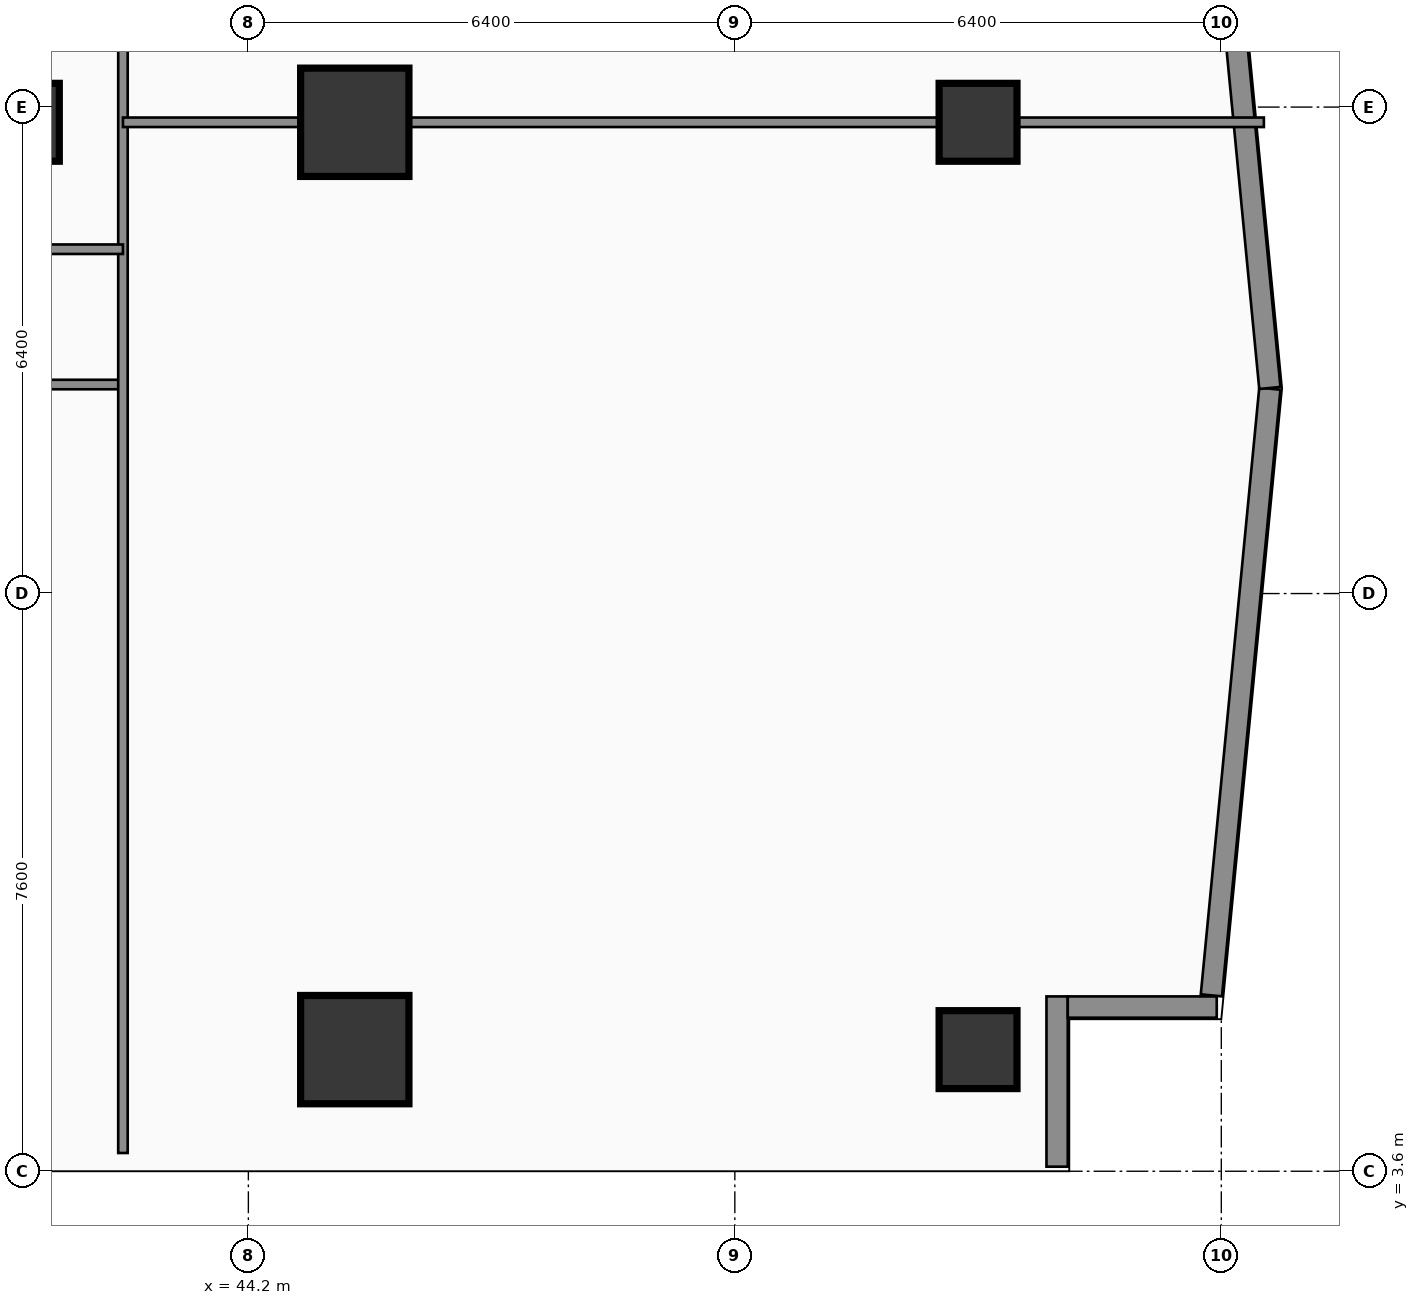
"""IFC4 building model, lengths in metres.
Left out: names, types, materials, properties, quantities, classifications, styles, units other than length and angle.
Written with IfcOpenShell. Run it as: python <this file> out.ifc"""

import sys

from ifc_helpers import new_model, si_unit, direction, frame, frame_2d, origin, origin_2d, place, context, subcontext, project, spatial, rectangle, extrude, element, fill, save


model = new_model("IFC4")
c1 = context("Model", 3, precision=1e-05, world=origin(), true_north=direction((0.0, 1.0)))
c2 = subcontext(c1, "Body", "Model", "MODEL_VIEW")
j1 = project(units=[si_unit("LENGTHUNIT", "METRE"), si_unit("PLANEANGLEUNIT", "RADIAN")], contexts=[c1])
p1 = place(None, origin())
s1 = spatial("IfcSite", under=j1, at=p1, CompositionType="ELEMENT")
p2 = place(p1, origin())
s2 = spatial("IfcBuilding", under=s1, at=p2, CompositionType="ELEMENT")
p3 = place(p2, frame((0.0, 0.0, 110.7)))
s3 = spatial("IfcBuildingStorey", under=s2, at=p3, CompositionType="ELEMENT", Elevation=110.7)
for number, where, z_axis, x_axis in (
    (1, (45.6, 5.2, 0.0), (0.0, 0.0, 1.0), (1.0, 0.0, 0.0)),
    (2, (45.6, 17.4, 0.0), (0.0, 0.0, 1.0), (1.0, 0.0, 0.0)),
):
    element("IfcColumn", number, at=place(p3, frame(where, z_axis=z_axis, x_axis=x_axis)), inside=s3, PredefinedType="COLUMN", context=c2, shape_type="SweptSolid", body=[
        extrude(rectangle(XDim=1.4, YDim=1.4, at=origin_2d()), origin(), (0.0, 0.0, 1.0), 3.54),
    ])
for number, where, z_axis, x_axis in (
    (3, (53.8, 5.2, 0.0), (0.0, 0.0, 1.0), (1.0, 0.0, 0.0)),
    (4, (53.8, 17.4, 0.0), (0.0, 0.0, 1.0), (1.0, 0.0, 0.0)),
    (5, (41.2, 17.4, 0.0), (0.0, 0.0, 1.0), (1.0, 0.0, 0.0)),
):
    element("IfcColumn", number, at=place(p3, frame(where, z_axis=z_axis, x_axis=x_axis)), inside=s3, PredefinedType="COLUMN", context=c2, shape_type="SweptSolid", body=[
        extrude(rectangle(XDim=1.0, YDim=1.0, at=origin_2d()), origin(), (0.0, 0.0, 1.0), 3.54),
    ])
p4 = place(p3, frame((54.84, 3.66, 0.0), z_axis=(0.0, 0.0, 1.0), x_axis=(0.0, 1.0, 0.0)))
e6 = element("IfcWall", 6, at=p4, inside=s3, PredefinedType="SOLIDWALL", context=c2, shape_type="SweptSolid", body=[
    extrude(rectangle(XDim=2.24, YDim=0.28, at=frame_2d((1.12, 0.0))), origin(), (0.0, 0.0, 1.0), 3.54),
])
p5 = place(p3, frame((54.98, 5.76, 0.0), z_axis=(0.0, 0.0, 1.0), x_axis=(1.0, 0.0, 0.0)))
e7 = element("IfcWall", 7, at=p5, inside=s3, PredefinedType="SOLIDWALL", context=c2, shape_type="SweptSolid", body=[
    extrude(rectangle(XDim=1.96, YDim=0.28, at=frame_2d((0.98, 0.0))), origin(), (0.0, 0.0, 1.0), 3.54),
])
for number, where, z_axis, x_axis in (
    (8, (56.869, 5.914, 0.0), (0.0, 0.0, 1.0), (0.096, 0.995, 0.0)),
    (9, (57.639, 13.905, 0.0), (0.0, 0.0, 1.0), (-0.096, 0.995, 0.0)),
):
    element("IfcWall", number, at=place(p3, frame(where, z_axis=z_axis, x_axis=x_axis)), inside=s3, PredefinedType="SOLIDWALL", context=c2, shape_type="SweptSolid", body=[
        extrude(rectangle(XDim=8.019, YDim=0.28, at=frame_2d((4.009, 0.0))), origin(), (0.0, 0.0, 1.0), 3.54),
    ])
p6 = place(p3, frame((37.65, 13.95, 0.0), z_axis=(0.0, 0.0, 1.0), x_axis=(1.0, 0.0, 0.0)))
e10 = element("IfcWall", 10, at=p6, inside=s3, PredefinedType="PARTITIONING", context=c2, shape_type="SweptSolid", body=[
    extrude(rectangle(XDim=4.9, YDim=0.125, at=frame_2d((2.45, 0.0))), origin(), (0.0, 0.0, 1.0), 3.54),
])
p7 = place(p6, frame((1.427, 0.0, 0.0)))
e11 = element("IfcOpeningElement", 11, at=p7, cuts=e10, PredefinedType="OPENING", context=c2, shape_type="SweptSolid", body=[
    extrude(rectangle(XDim=0.95, YDim=2.15, at=frame_2d((0.475, 1.075))), frame((0.0, 0.073, 0.0), z_axis=(0.0, -1.0, 0.0), x_axis=(1.0, 0.0, 0.0)), (0.0, 0.0, 1.0), 0.145),
])
p8 = place(p3, frame((42.55, 3.84, 0.0), z_axis=(0.0, 0.0, 1.0), x_axis=(0.0, 1.0, 0.0)))
e12 = element("IfcWall", 12, at=p8, inside=s3, PredefinedType="PARTITIONING", context=c2, shape_type="SweptSolid", body=[
    extrude(rectangle(XDim=20.12, YDim=0.125, at=frame_2d((10.06, 0.0))), origin(), (0.0, 0.0, 1.0), 3.54),
])
p9 = place(p8, frame((10.5, 0.0, 0.0)))
e13 = element("IfcOpeningElement", 13, at=p9, cuts=e12, PredefinedType="OPENING", context=c2, shape_type="SweptSolid", body=[
    extrude(rectangle(XDim=1.0, YDim=2.2, at=frame_2d((0.5, 1.1))), frame((0.0, 0.073, 0.0), z_axis=(0.0, -1.0, 0.0), x_axis=(1.0, 0.0, 0.0)), (0.0, 0.0, 1.0), 0.145),
])
p10 = place(p3, frame((42.55, 17.4, 0.0), z_axis=(0.0, 0.0, 1.0), x_axis=(1.0, 0.0, 0.0)))
e14 = element("IfcWall", 14, at=p10, inside=s3, PredefinedType="PARTITIONING", context=c2, shape_type="SweptSolid", body=[
    extrude(rectangle(XDim=15.01, YDim=0.125, at=frame_2d((7.505, 0.0))), origin(), (0.0, 0.0, 1.0), 3.24),
])
p11 = place(p10, frame((4.244, 0.0, 0.0)))
e15 = element("IfcOpeningElement", 15, at=p11, cuts=e14, PredefinedType="OPENING", context=c2, shape_type="SweptSolid", body=[
    extrude(rectangle(XDim=0.95, YDim=2.15, at=frame_2d((0.475, 1.075))), frame((0.0, 0.073, 0.0), z_axis=(0.0, -1.0, 0.0), x_axis=(1.0, 0.0, 0.0)), (0.0, 0.0, 1.0), 0.145),
])
p12 = place(p3, frame((23.65, 15.73, 0.0), z_axis=(0.0, 0.0, 1.0), x_axis=(1.0, 0.0, 0.0)))
e16 = element("IfcWall", 16, at=p12, inside=s3, PredefinedType="PARTITIONING", context=c2, shape_type="SweptSolid", body=[
    extrude(rectangle(XDim=18.9, YDim=0.125, at=frame_2d((9.45, 0.0))), origin(), (0.0, 0.0, 1.0), 3.09),
])
p13 = place(p12, frame((4.615, 0.0, 0.0)))
e17 = element("IfcOpeningElement", 17, at=p13, cuts=e16, PredefinedType="OPENING", context=c2, shape_type="SweptSolid", body=[
    extrude(rectangle(XDim=0.95, YDim=2.15, at=frame_2d((0.475, 1.075))), frame((0.0, 0.073, 0.0), z_axis=(0.0, -1.0, 0.0), x_axis=(1.0, 0.0, 0.0)), (0.0, 0.0, 1.0), 0.145),
])
p14 = place(p12, frame((14.29, 0.0, 0.0)))
e18 = element("IfcOpeningElement", 18, at=p14, cuts=e16, PredefinedType="OPENING", context=c2, shape_type="SweptSolid", body=[
    extrude(rectangle(XDim=0.95, YDim=2.15, at=frame_2d((0.475, 1.075))), frame((0.0, 0.073, 0.0), z_axis=(0.0, -1.0, 0.0), x_axis=(1.0, 0.0, 0.0)), (0.0, 0.0, 1.0), 0.145),
])
p15 = place(p9, origin())
e19 = element("IfcDoor", 19, at=p15, inside=s3, OperationType="SINGLE_SWING_RIGHT", PredefinedType="DOOR", context=c2, shape_type="SweptSolid", body=[
    extrude(rectangle(XDim=1.0, YDim=2.2, at=frame_2d((0.5, 1.1))), frame((0.0, 0.025, 0.0), z_axis=(0.0, -1.0, 0.0), x_axis=(1.0, 0.0, 0.0)), (0.0, 0.0, 1.0), 0.05),
])
fill(e13, e19)
p16 = place(p11, origin())
e20 = element("IfcDoor", 20, at=p16, inside=s3, OperationType="SINGLE_SWING_LEFT", PredefinedType="DOOR", context=c2, shape_type="SweptSolid", body=[
    extrude(rectangle(XDim=0.95, YDim=2.15, at=frame_2d((0.475, 1.075))), frame((0.0, 0.025, 0.0), z_axis=(0.0, -1.0, 0.0), x_axis=(1.0, 0.0, 0.0)), (0.0, 0.0, 1.0), 0.05),
])
fill(e15, e20)
save(model, sys.argv[1])
